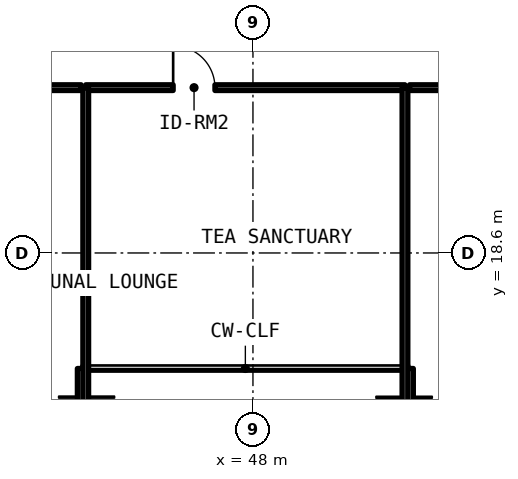
"""IFC4 building model, lengths in metres.
Left out: names, types, materials, properties, quantities, classifications, styles, units other than length and angle.
Written with IfcOpenShell. Run it as: python <this file> out.ifc"""

import sys

from ifc_helpers import new_model, si_unit, direction, frame, frame_2d, origin, place, context, subcontext, project, spatial, rectangle, extrude, element, fill, save


model = new_model("IFC4")
c1 = context("Model", 3, precision=1e-05, world=origin(), true_north=direction((0.0, 1.0)))
c2 = subcontext(c1, "Body", "Model", "MODEL_VIEW")
j1 = project(units=[si_unit("LENGTHUNIT", "METRE"), si_unit("PLANEANGLEUNIT", "RADIAN")], contexts=[c1])
p1 = place(None, origin())
s1 = spatial("IfcSite", under=j1, at=p1, CompositionType="ELEMENT")
p2 = place(p1, origin())
s2 = spatial("IfcBuilding", under=s1, at=p2, CompositionType="ELEMENT")
p3 = place(p2, frame((0.0, 0.0, 208.23)))
s3 = spatial("IfcBuildingStorey", under=s2, at=p3, CompositionType="ELEMENT", Elevation=208.23)
p4 = place(p3, frame((43.49, 14.054, 0.0), z_axis=(0.0, 0.0, 1.0), x_axis=(0.0, 1.0, 0.0)))
e1 = element("IfcWall", 1, at=p4, inside=s3, PredefinedType="SOLIDWALL", context=c2, shape_type="SweptSolid", body=[
    extrude(rectangle(XDim=1.506, YDim=0.22, at=frame_2d((0.753, 0.0))), origin(), (0.0, 0.0, 1.0), 3.41),
])
p5 = place(p3, frame((52.11, 15.56, 0.0), z_axis=(0.0, 0.0, 1.0), x_axis=(0.0, -1.0, 0.0)))
e2 = element("IfcWall", 2, at=p5, inside=s3, PredefinedType="SOLIDWALL", context=c2, shape_type="SweptSolid", body=[
    extrude(rectangle(XDim=1.515, YDim=0.22, at=frame_2d((0.757, 0.0))), origin(), (0.0, 0.0, 1.0), 3.41),
])
p6 = place(p3, frame((43.6, 22.95, 0.0), z_axis=(0.0, 0.0, 1.0), x_axis=(1.0, 0.0, 0.0)))
e3 = element("IfcWall", 3, at=p6, inside=s3, PredefinedType="SOLIDWALL", context=c2, shape_type="SweptSolid", body=[
    extrude(rectangle(XDim=8.4, YDim=0.15, at=frame_2d((4.2, 0.0))), origin(), (0.0, 0.0, 1.0), 2.63),
])
p7 = place(p6, frame((2.3, 0.0, 0.0)))
e4 = element("IfcOpeningElement", 4, at=p7, cuts=e3, PredefinedType="OPENING", context=c2, shape_type="SweptSolid", body=[
    extrude(rectangle(XDim=1.1, YDim=2.15, at=frame_2d((0.55, 1.075))), frame((0.0, 0.085, 0.0), z_axis=(0.0, -1.0, 0.0), x_axis=(1.0, 0.0, 0.0)), (0.0, 0.0, 1.0), 0.17),
])
p8 = place(p3, frame((43.6, 14.056, 0.0), z_axis=(0.0, 0.0, 1.0), x_axis=(0.0, 1.0, 0.0)))
e5 = element("IfcWall", 5, at=p8, inside=s3, PredefinedType="SOLIDWALL", context=c2, shape_type="SweptSolid", body=[
    extrude(rectangle(XDim=8.894, YDim=0.15, at=frame_2d((4.447, 0.0))), origin(), (0.0, 0.0, 1.0), 2.63),
])
p9 = place(p3, frame((52.0, 14.046, 0.0), z_axis=(0.0, 0.0, 1.0), x_axis=(0.0, 1.0, 0.0)))
e6 = element("IfcWall", 6, at=p9, inside=s3, PredefinedType="SOLIDWALL", context=c2, shape_type="SweptSolid", body=[
    extrude(rectangle(XDim=8.904, YDim=0.15, at=frame_2d((4.452, 0.0))), origin(), (0.0, 0.0, 1.0), 2.63),
])
p10 = place(p3, frame((40.507, 22.95, 0.0), z_axis=(0.0, 0.0, 1.0), x_axis=(1.0, 0.0, 0.0)))
e7 = element("IfcWall", 7, at=p10, inside=s3, PredefinedType="SOLIDWALL", context=c2, shape_type="SweptSolid", body=[
    extrude(rectangle(XDim=2.973, YDim=0.15, at=frame_2d((1.486, 0.0))), origin(), (0.0, 0.0, 1.0), 2.63),
])
p11 = place(p10, frame((0.936, 0.0, 0.0)))
e8 = element("IfcOpeningElement", 8, at=p11, cuts=e7, PredefinedType="OPENING", context=c2, shape_type="SweptSolid", body=[
    extrude(rectangle(XDim=1.1, YDim=2.15, at=frame_2d((0.55, 1.075))), frame((0.0, 0.085, 0.0), z_axis=(0.0, -1.0, 0.0), x_axis=(1.0, 0.0, 0.0)), (0.0, 0.0, 1.0), 0.17),
])
p12 = place(p3, frame((52.12, 22.95, 0.0), z_axis=(0.0, 0.0, 1.0), x_axis=(1.0, 0.0, 0.0)))
e9 = element("IfcWall", 9, at=p12, inside=s3, PredefinedType="SOLIDWALL", context=c2, shape_type="SweptSolid", body=[
    extrude(rectangle(XDim=6.585, YDim=0.15, at=frame_2d((3.293, 0.0))), origin(), (0.0, 0.0, 1.0), 2.63),
])
p13 = place(p12, frame((2.818, 0.0, 0.0)))
e10 = element("IfcOpeningElement", 10, at=p13, cuts=e9, PredefinedType="OPENING", context=c2, shape_type="SweptSolid", body=[
    extrude(rectangle(XDim=0.95, YDim=2.15, at=frame_2d((0.475, 1.075))), frame((0.0, 0.085, 0.0), z_axis=(0.0, -1.0, 0.0), x_axis=(1.0, 0.0, 0.0)), (0.0, 0.0, 1.0), 0.17),
])
p14 = place(p7, origin())
e11 = element("IfcDoor", 11, at=p14, inside=s3, OperationType="SINGLE_SWING_LEFT", PredefinedType="DOOR", context=c2, shape_type="SweptSolid", body=[
    extrude(rectangle(XDim=1.1, YDim=2.15, at=frame_2d((0.55, 1.075))), frame((0.0, 0.025, 0.0), z_axis=(0.0, -1.0, 0.0), x_axis=(1.0, 0.0, 0.0)), (0.0, 0.0, 1.0), 0.05),
])
fill(e4, e11)
save(model, sys.argv[1])
